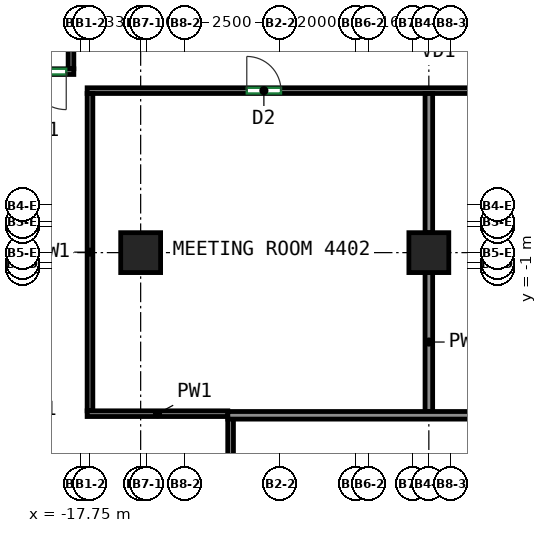
"""IFC4 building model, lengths in metres.
Left out: names, types, materials, properties, quantities, classifications, styles, units other than length and angle.
Written with IfcOpenShell. Run it as: python <this file> out.ifc"""

import sys

from ifc_helpers import new_model, si_unit, direction, frame, frame_2d, origin, origin_2d, place, context, subcontext, project, spatial, rectangle, extrude, source, transform, mapped, element, fill, save


model = new_model("IFC4")
c1 = context("Model", 3, precision=1e-05, world=origin(), true_north=direction((0.0, 1.0)))
c2 = subcontext(c1, "Body", "Model", "MODEL_VIEW")
j1 = project(units=[si_unit("LENGTHUNIT", "METRE"), si_unit("PLANEANGLEUNIT", "RADIAN")], contexts=[c1])
p1 = place(None, origin())
s1 = spatial("IfcSite", under=j1, at=p1, CompositionType="ELEMENT")
p2 = place(p1, origin())
s2 = spatial("IfcBuilding", under=s1, at=p2, CompositionType="ELEMENT")
p3 = place(p2, frame((0.0, 0.0, 185.5)))
s3 = spatial("IfcBuildingStorey", under=s2, at=p3, CompositionType="ELEMENT", Elevation=185.5)
m1 = source(origin(), c2, "Body", "SweptSolid", [
    extrude(rectangle(XDim=1.05, YDim=1.05, at=origin_2d()), origin(), (0.0, 0.0, 1.0), 3.12),
])
for number, where, z_axis, x_axis in (
    (1, (-16.167, -0.562, 0.0), (0.0, 0.0, 1.0), (1.0, 0.0, 0.0)),
    (2, (-8.583, -0.562, 0.0), (0.0, 0.0, 1.0), (1.0, 0.0, 0.0)),
):
    element("IfcColumn", number, at=place(p3, frame(where, z_axis=z_axis, x_axis=x_axis)), inside=s3, PredefinedType="COLUMN", context=c2, shape_type="MappedRepresentation", body=[
        mapped(m1, transform((0.0, 0.0, 0.0))),
    ])
p4 = place(p3, frame((-17.925, 4.2, 0.0), z_axis=(0.0, 0.0, 1.0), x_axis=(-1.0, 0.0, 0.0)))
e3 = element("IfcWall", 3, at=p4, inside=s3, PredefinedType="PARTITIONING", context=c2, shape_type="SweptSolid", body=[
    extrude(rectangle(XDim=2.109, YDim=0.15, at=frame_2d((1.054, 0.0))), origin(), (0.0, 0.0, 1.0), 3.12),
])
p5 = place(p4, frame((0.2, 0.0, 0.0)))
e4 = element("IfcOpeningElement", 4, at=p5, cuts=e3, PredefinedType="OPENING", context=c2, shape_type="SweptSolid", body=[
    extrude(rectangle(XDim=1.0, YDim=2.1, at=frame_2d((0.5, 1.05))), frame((0.0, 0.085, 0.0), z_axis=(0.0, -1.0, 0.0), x_axis=(1.0, 0.0, 0.0)), (0.0, 0.0, 1.0), 0.17),
])
p6 = place(p3, frame((-18.0, 4.275, 0.0), z_axis=(0.0, 0.0, 1.0), x_axis=(0.0, 1.0, 0.0)))
e5 = element("IfcWall", 5, at=p6, inside=s3, PredefinedType="PARTITIONING", context=c2, shape_type="SweptSolid", body=[
    extrude(rectangle(XDim=1.485, YDim=0.15, at=frame_2d((0.743, 0.0))), origin(), (0.0, 0.0, 1.0), 3.12),
])
p7 = place(p3, frame((-17.575, 3.7, 0.0), z_axis=(0.0, 0.0, 1.0), x_axis=(1.0, 0.0, 0.0)))
e6 = element("IfcWall", 6, at=p7, inside=s3, PredefinedType="PARTITIONING", context=c2, shape_type="SweptSolid", body=[
    extrude(rectangle(XDim=33.85, YDim=0.15, at=frame_2d((16.925, 0.0))), origin(), (0.0, 0.0, 1.0), 3.12),
])
p8 = place(p7, frame((4.201, 0.0, 0.0)))
e7 = element("IfcOpeningElement", 7, at=p8, cuts=e6, PredefinedType="OPENING", context=c2, shape_type="SweptSolid", body=[
    extrude(rectangle(XDim=0.9, YDim=2.1, at=frame_2d((0.45, 1.05))), frame((0.0, 0.085, 0.0), z_axis=(0.0, -1.0, 0.0), x_axis=(1.0, 0.0, 0.0)), (0.0, 0.0, 1.0), 0.17),
])
p9 = place(p7, frame((13.22, 0.0, 0.0)))
e8 = element("IfcOpeningElement", 8, at=p9, cuts=e6, PredefinedType="OPENING", context=c2, shape_type="SweptSolid", body=[
    extrude(rectangle(XDim=0.9, YDim=2.1, at=frame_2d((0.45, 1.05))), frame((0.0, 0.085, 0.0), z_axis=(0.0, -1.0, 0.0), x_axis=(1.0, 0.0, 0.0)), (0.0, 0.0, 1.0), 0.17),
])
p10 = place(p7, frame((23.959, 0.0, 0.0)))
e9 = element("IfcOpeningElement", 9, at=p10, cuts=e6, PredefinedType="OPENING", context=c2, shape_type="SweptSolid", body=[
    extrude(rectangle(XDim=0.9, YDim=2.1, at=frame_2d((0.45, 1.05))), frame((0.0, 0.085, 0.0), z_axis=(0.0, -1.0, 0.0), x_axis=(1.0, 0.0, 0.0)), (0.0, 0.0, 1.0), 0.17),
])
p11 = place(p3, frame((-17.5, -4.725, 0.0), z_axis=(0.0, 0.0, 1.0), x_axis=(0.0, 1.0, 0.0)))
e10 = element("IfcWall", 10, at=p11, inside=s3, PredefinedType="PARTITIONING", context=c2, shape_type="SweptSolid", body=[
    extrude(rectangle(XDim=8.35, YDim=0.15, at=frame_2d((4.175, 0.0))), origin(), (0.0, 0.0, 1.0), 3.12),
])
p12 = place(p3, frame((-17.575, -4.8, 0.0), z_axis=(0.0, 0.0, 1.0), x_axis=(1.0, 0.0, 0.0)))
e11 = element("IfcWall", 11, at=p12, inside=s3, PredefinedType="PARTITIONING", context=c2, shape_type="SweptSolid", body=[
    extrude(rectangle(XDim=3.702, YDim=0.15, at=frame_2d((1.851, 0.0))), origin(), (0.0, 0.0, 1.0), 3.12),
])
p13 = place(p3, frame((-13.8, -7.75, 0.0), z_axis=(0.0, 0.0, 1.0), x_axis=(0.0, 1.0, 0.0)))
e12 = element("IfcWall", 12, at=p13, inside=s3, PredefinedType="PARTITIONING", context=c2, shape_type="SweptSolid", body=[
    extrude(rectangle(XDim=2.817, YDim=0.15, at=frame_2d((1.408, 0.0))), origin(), (0.0, 0.0, 1.0), 3.12),
])
p14 = place(p3, frame((-8.583, -0.037, 0.0), z_axis=(0.0, 0.0, 1.0), x_axis=(0.0, 1.0, 0.0)))
e13 = element("IfcWall", 13, at=p14, inside=s3, PredefinedType="PARTITIONING", context=c2, shape_type="SweptSolid", body=[
    extrude(rectangle(XDim=3.66, YDim=0.2, at=frame_2d((1.83, 0.0))), origin(), (0.0, 0.0, 1.0), 3.12),
])
p15 = place(p3, frame((-8.583, -4.743, 0.0), z_axis=(0.0, 0.0, 1.0), x_axis=(0.0, 1.0, 0.0)))
e14 = element("IfcWall", 14, at=p15, inside=s3, PredefinedType="PARTITIONING", context=c2, shape_type="SweptSolid", body=[
    extrude(rectangle(XDim=3.656, YDim=0.2, at=frame_2d((1.828, 0.0))), origin(), (0.0, 0.0, 1.0), 2.52),
])
p16 = place(p3, frame((-13.873, -4.843, 0.0), z_axis=(0.0, 0.0, 1.0), x_axis=(1.0, 0.0, 0.0)))
e15 = element("IfcWall", 15, at=p16, inside=s3, PredefinedType="PARTITIONING", context=c2, shape_type="SweptSolid", body=[
    extrude(rectangle(XDim=30.146, YDim=0.2, at=frame_2d((15.073, 0.0))), origin(), (0.0, 0.0, 1.0), 3.12),
])
p17 = place(p8, origin())
e16 = element("IfcDoor", 16, at=p17, inside=s3, OperationType="SINGLE_SWING_LEFT", PredefinedType="DOOR", context=c2, shape_type="SweptSolid", body=[
    extrude(rectangle(XDim=0.9, YDim=2.1, at=frame_2d((0.45, 1.05))), frame((0.0, 0.025, 0.0), z_axis=(0.0, -1.0, 0.0), x_axis=(1.0, 0.0, 0.0)), (0.0, 0.0, 1.0), 0.05),
])
fill(e7, e16)
p18 = place(p5, origin())
e17 = element("IfcDoor", 17, at=p18, inside=s3, OperationType="SINGLE_SWING_LEFT", PredefinedType="DOOR", context=c2, shape_type="SweptSolid", body=[
    extrude(rectangle(XDim=1.0, YDim=2.1, at=frame_2d((0.5, 1.05))), frame((0.0, 0.025, 0.0), z_axis=(0.0, -1.0, 0.0), x_axis=(1.0, 0.0, 0.0)), (0.0, 0.0, 1.0), 0.05),
])
fill(e4, e17)
save(model, sys.argv[1])
